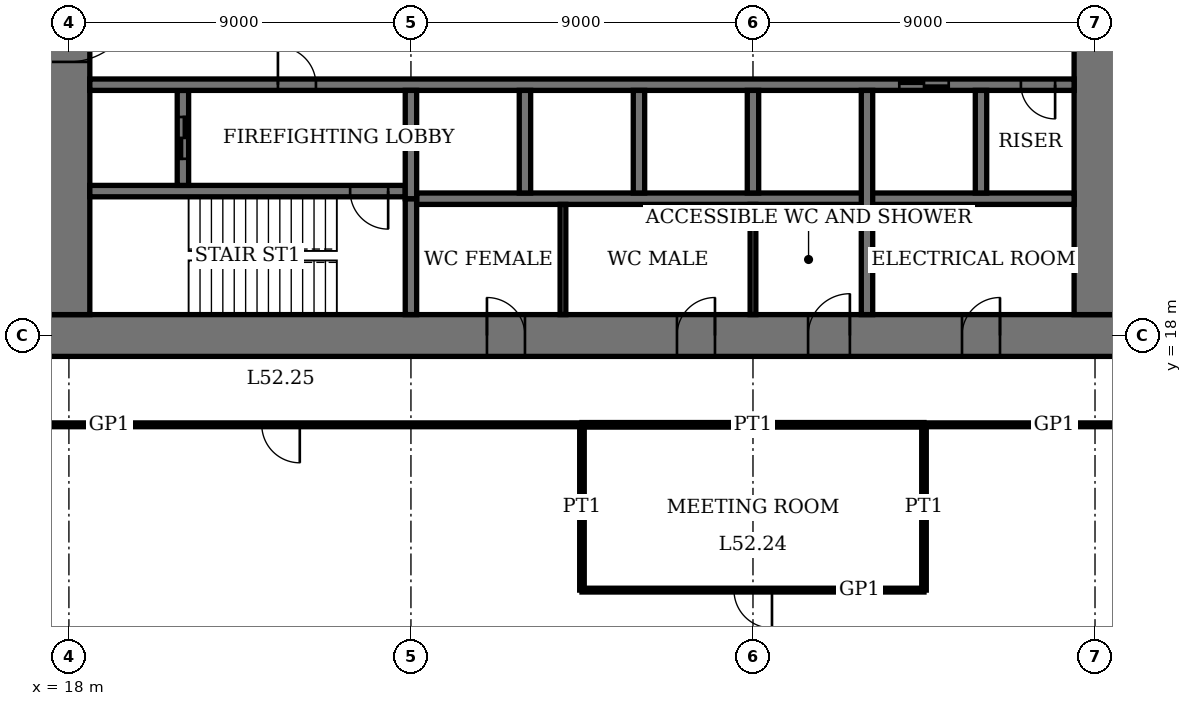
"""IFC4 building model, lengths in metres.
Left out: names, types, materials, properties, quantities, classifications, styles, units other than length and angle.
Written with IfcOpenShell. Run it as: python <this file> out.ifc"""

import sys

from ifc_helpers import new_model, si_unit, direction, frame, frame_2d, origin, place, context, subcontext, project, spatial, rectangle, extrude, element, fill, save


model = new_model("IFC4")
c1 = context("Model", 3, precision=1e-05, world=origin(), true_north=direction((0.0, 1.0)))
c2 = subcontext(c1, "Body", "Model", "MODEL_VIEW")
j1 = project(units=[si_unit("LENGTHUNIT", "METRE"), si_unit("PLANEANGLEUNIT", "RADIAN")], contexts=[c1])
p1 = place(None, origin())
s1 = spatial("IfcSite", under=j1, at=p1, CompositionType="ELEMENT")
p2 = place(p1, origin())
s2 = spatial("IfcBuilding", under=s1, at=p2, CompositionType="ELEMENT")
p3 = place(p2, frame((0.0, 0.0, 214.2)))
s3 = spatial("IfcBuildingStorey", under=s2, at=p3, CompositionType="ELEMENT", Elevation=214.2)
p4 = place(p3, frame((17.45, 18.0, 0.0), z_axis=(0.0, 0.0, 1.0), x_axis=(1.0, 0.0, 0.0)))
e1 = element("IfcWall", 1, at=p4, inside=s3, PredefinedType="SHEAR", context=c2, shape_type="SweptSolid", body=[
    extrude(rectangle(XDim=28.1, YDim=1.1, at=frame_2d((14.05, 0.0))), origin(), (0.0, 0.0, 1.0), 4.0),
])
p5 = place(p4, frame((11.55, 0.0, 0.0)))
e2 = element("IfcOpeningElement", 2, at=p5, cuts=e1, PredefinedType="OPENING", context=c2, shape_type="SweptSolid", body=[
    extrude(rectangle(XDim=1.0, YDim=2.4, at=frame_2d((0.5, 1.2))), frame((0.0, 0.56, 0.0), z_axis=(0.0, -1.0, 0.0), x_axis=(1.0, 0.0, 0.0)), (0.0, 0.0, 1.0), 1.12),
])
p6 = place(p4, frame((16.55, 0.0, 0.0)))
e3 = element("IfcOpeningElement", 3, at=p6, cuts=e1, PredefinedType="OPENING", context=c2, shape_type="SweptSolid", body=[
    extrude(rectangle(XDim=1.0, YDim=2.4, at=frame_2d((0.5, 1.2))), frame((0.0, 0.56, 0.0), z_axis=(0.0, -1.0, 0.0), x_axis=(1.0, 0.0, 0.0)), (0.0, 0.0, 1.0), 1.12),
])
p7 = place(p4, frame((20.0, 0.0, 0.0)))
e4 = element("IfcOpeningElement", 4, at=p7, cuts=e1, PredefinedType="OPENING", context=c2, shape_type="SweptSolid", body=[
    extrude(rectangle(XDim=1.1, YDim=2.4, at=frame_2d((0.55, 1.2))), frame((0.0, 0.56, 0.0), z_axis=(0.0, -1.0, 0.0), x_axis=(1.0, 0.0, 0.0)), (0.0, 0.0, 1.0), 1.12),
])
p8 = place(p4, frame((24.05, 0.0, 0.0)))
e5 = element("IfcOpeningElement", 5, at=p8, cuts=e1, PredefinedType="OPENING", context=c2, shape_type="SweptSolid", body=[
    extrude(rectangle(XDim=1.0, YDim=2.4, at=frame_2d((0.5, 1.2))), frame((0.0, 0.56, 0.0), z_axis=(0.0, -1.0, 0.0), x_axis=(1.0, 0.0, 0.0)), (0.0, 0.0, 1.0), 1.12),
])
p9 = place(p3, frame((18.0, 35.45, 0.0), z_axis=(0.0, 0.0, 1.0), x_axis=(0.0, -1.0, 0.0)))
e6 = element("IfcWall", 6, at=p9, inside=s3, PredefinedType="SHEAR", context=c2, shape_type="SweptSolid", body=[
    extrude(rectangle(XDim=16.9, YDim=1.1, at=frame_2d((8.45, 0.0))), origin(), (0.0, 0.0, 1.0), 4.0),
])
p10 = place(p9, frame((8.45, 0.0, 0.0)))
e7 = element("IfcOpeningElement", 7, at=p10, cuts=e6, PredefinedType="OPENING", context=c2, shape_type="SweptSolid", body=[
    extrude(rectangle(XDim=1.8, YDim=2.4, at=frame_2d((0.9, 1.2))), frame((0.0, 0.56, 0.0), z_axis=(0.0, -1.0, 0.0), x_axis=(1.0, 0.0, 0.0)), (0.0, 0.0, 1.0), 1.12),
])
p11 = place(p3, frame((45.0, 18.55, 0.0), z_axis=(0.0, 0.0, 1.0), x_axis=(0.0, 1.0, 0.0)))
e8 = element("IfcWall", 8, at=p11, inside=s3, PredefinedType="SHEAR", context=c2, shape_type="SweptSolid", body=[
    extrude(rectangle(XDim=16.9, YDim=1.1, at=frame_2d((8.45, 0.0))), origin(), (0.0, 0.0, 1.0), 4.0),
])
p12 = place(p11, frame((8.45, 0.0, 0.0)))
e9 = element("IfcOpeningElement", 9, at=p12, cuts=e8, PredefinedType="OPENING", context=c2, shape_type="SweptSolid", body=[
    extrude(rectangle(XDim=1.8, YDim=2.4, at=frame_2d((0.9, 1.2))), frame((0.0, 0.56, 0.0), z_axis=(0.0, -1.0, 0.0), x_axis=(1.0, 0.0, 0.0)), (0.0, 0.0, 1.0), 1.12),
])
p13 = place(p3, frame((18.55, 21.8, 0.0), z_axis=(0.0, 0.0, 1.0), x_axis=(1.0, 0.0, 0.0)))
e10 = element("IfcWall", 10, at=p13, inside=s3, PredefinedType="SHEAR", context=c2, shape_type="SweptSolid", body=[
    extrude(rectangle(XDim=8.3, YDim=0.3, at=frame_2d((4.15, 0.0))), origin(), (0.0, 0.0, 1.0), 4.0),
])
p14 = place(p13, frame((6.85, 0.0, 0.0)))
e11 = element("IfcOpeningElement", 11, at=p14, cuts=e10, PredefinedType="OPENING", context=c2, shape_type="SweptSolid", body=[
    extrude(rectangle(XDim=1.0, YDim=2.4, at=frame_2d((0.5, 1.2))), frame((0.0, 0.16, 0.0), z_axis=(0.0, -1.0, 0.0), x_axis=(1.0, 0.0, 0.0)), (0.0, 0.0, 1.0), 0.32),
])
p15 = place(p3, frame((27.0, 18.55, 0.0), z_axis=(0.0, 0.0, 1.0), x_axis=(0.0, 1.0, 0.0)))
e12 = element("IfcWall", 12, at=p15, inside=s3, PredefinedType="SHEAR", context=c2, shape_type="SweptSolid", body=[
    extrude(rectangle(XDim=3.05, YDim=0.3, at=frame_2d((1.525, 0.0))), origin(), (0.0, 0.0, 1.0), 4.0),
])
p16 = place(p3, frame((21.0, 21.95, 0.0), z_axis=(0.0, 0.0, 1.0), x_axis=(0.0, 1.0, 0.0)))
e13 = element("IfcWall", 13, at=p16, inside=s3, PredefinedType="SHEAR", context=c2, shape_type="SweptSolid", body=[
    extrude(rectangle(XDim=2.5, YDim=0.3, at=frame_2d((1.25, 0.0))), origin(), (0.0, 0.0, 1.0), 4.0),
])
p17 = place(p16, frame((0.7, 0.0, 0.0)))
e14 = element("IfcOpeningElement", 14, at=p17, cuts=e13, PredefinedType="OPENING", context=c2, shape_type="SweptSolid", body=[
    extrude(rectangle(XDim=1.1, YDim=2.4, at=frame_2d((0.55, 1.2))), frame((0.0, 0.16, 0.0), z_axis=(0.0, -1.0, 0.0), x_axis=(1.0, 0.0, 0.0)), (0.0, 0.0, 1.0), 0.32),
])
p18 = place(p3, frame((18.55, 24.6, 0.0), z_axis=(0.0, 0.0, 1.0), x_axis=(1.0, 0.0, 0.0)))
e15 = element("IfcWall", 15, at=p18, inside=s3, PredefinedType="SHEAR", context=c2, shape_type="SweptSolid", body=[
    extrude(rectangle(XDim=25.9, YDim=0.3, at=frame_2d((12.95, 0.0))), origin(), (0.0, 0.0, 1.0), 4.0),
])
p19 = place(p18, frame((4.95, 0.0, 0.0)))
e16 = element("IfcOpeningElement", 16, at=p19, cuts=e15, PredefinedType="OPENING", context=c2, shape_type="SweptSolid", body=[
    extrude(rectangle(XDim=1.0, YDim=2.4, at=frame_2d((0.5, 1.2))), frame((0.0, 0.16, 0.0), z_axis=(0.0, -1.0, 0.0), x_axis=(1.0, 0.0, 0.0)), (0.0, 0.0, 1.0), 0.32),
])
p20 = place(p18, frame((24.5, 0.0, 0.0)))
e17 = element("IfcOpeningElement", 17, at=p20, cuts=e15, PredefinedType="OPENING", context=c2, shape_type="SweptSolid", body=[
    extrude(rectangle(XDim=0.9, YDim=2.1, at=frame_2d((0.45, 1.05))), frame((0.0, 0.16, 0.0), z_axis=(0.0, -1.0, 0.0), x_axis=(1.0, 0.0, 0.0)), (0.0, 0.0, 1.0), 0.32),
])
p21 = place(p18, frame((21.3, 0.0, 0.0)))
e18 = element("IfcOpeningElement", 18, at=p21, cuts=e15, PredefinedType="OPENING", context=c2, shape_type="SweptSolid", body=[
    extrude(rectangle(XDim=1.3, YDim=2.4, at=frame_2d((0.65, 1.2))), frame((0.0, 0.16, 0.0), z_axis=(0.0, -1.0, 0.0), x_axis=(1.0, 0.0, 0.0)), (0.0, 0.0, 1.0), 0.32),
])
p22 = place(p3, frame((27.15, 21.6, 0.0), z_axis=(0.0, 0.0, 1.0), x_axis=(1.0, 0.0, 0.0)))
e19 = element("IfcWall", 19, at=p22, inside=s3, PredefinedType="SHEAR", context=c2, shape_type="SweptSolid", body=[
    extrude(rectangle(XDim=17.3, YDim=0.3, at=frame_2d((8.65, 0.0))), origin(), (0.0, 0.0, 1.0), 4.0),
])
for number, where, z_axis, x_axis in (
    (20, (30.0, 21.75, 0.0), (0.0, 0.0, 1.0), (0.0, 1.0, 0.0)),
    (21, (33.0, 21.75, 0.0), (0.0, 0.0, 1.0), (0.0, 1.0, 0.0)),
    (22, (36.0, 21.75, 0.0), (0.0, 0.0, 1.0), (0.0, 1.0, 0.0)),
):
    element("IfcWall", number, at=place(p3, frame(where, z_axis=z_axis, x_axis=x_axis)), inside=s3, PredefinedType="SHEAR", context=c2, shape_type="SweptSolid", body=[
        extrude(rectangle(XDim=2.7, YDim=0.3, at=frame_2d((1.35, 0.0))), origin(), (0.0, 0.0, 1.0), 4.0),
    ])
p23 = place(p3, frame((39.0, 18.55, 0.0), z_axis=(0.0, 0.0, 1.0), x_axis=(0.0, 1.0, 0.0)))
e23 = element("IfcWall", 23, at=p23, inside=s3, PredefinedType="SHEAR", context=c2, shape_type="SweptSolid", body=[
    extrude(rectangle(XDim=5.9, YDim=0.3, at=frame_2d((2.95, 0.0))), origin(), (0.0, 0.0, 1.0), 4.0),
])
p24 = place(p3, frame((42.0, 21.75, 0.0), z_axis=(0.0, 0.0, 1.0), x_axis=(0.0, 1.0, 0.0)))
e24 = element("IfcWall", 24, at=p24, inside=s3, PredefinedType="SHEAR", context=c2, shape_type="SweptSolid", body=[
    extrude(rectangle(XDim=2.7, YDim=0.3, at=frame_2d((1.35, 0.0))), origin(), (0.0, 0.0, 1.0), 4.0),
])
p25 = place(p3, frame((27.0, 21.6, 0.0), z_axis=(0.0, 0.0, 1.0), x_axis=(0.0, 1.0, 0.0)))
e25 = element("IfcWall", 25, at=p25, inside=s3, PredefinedType="SHEAR", context=c2, shape_type="SweptSolid", body=[
    extrude(rectangle(XDim=2.85, YDim=0.3, at=frame_2d((1.425, 0.0))), origin(), (0.0, 0.0, 1.0), 4.0),
])
p26 = place(p3, frame((31.5, 11.3, 0.0), z_axis=(0.0, 0.0, 1.0), x_axis=(1.0, 0.0, 0.0)))
e26 = element("IfcWall", 26, at=p26, inside=s3, PredefinedType="PARTITIONING", context=c2, shape_type="SweptSolid", body=[
    extrude(rectangle(XDim=9.0, YDim=0.1, at=frame_2d((4.5, 0.0))), origin(), (0.0, 0.0, 1.0), 3.75),
])
p27 = place(p26, frame((4.0, 0.0, 0.0)))
e27 = element("IfcOpeningElement", 27, at=p27, cuts=e26, PredefinedType="OPENING", context=c2, shape_type="SweptSolid", body=[
    extrude(rectangle(XDim=1.0, YDim=2.4, at=frame_2d((0.5, 1.2))), frame((0.0, 0.06, 0.0), z_axis=(0.0, -1.0, 0.0), x_axis=(1.0, 0.0, 0.0)), (0.0, 0.0, 1.0), 0.12),
])
p28 = place(p3, frame((31.5, 15.65, 0.0), z_axis=(0.0, 0.0, 1.0), x_axis=(1.0, 0.0, 0.0)))
e28 = element("IfcWall", 28, at=p28, inside=s3, PredefinedType="PARTITIONING", context=c2, shape_type="SweptSolid", body=[
    extrude(rectangle(XDim=9.0, YDim=0.12, at=frame_2d((4.5, 0.0))), origin(), (0.0, 0.0, 1.0), 3.75),
])
p29 = place(p3, frame((15.65, 15.65, 0.0), z_axis=(0.0, 0.0, 1.0), x_axis=(1.0, 0.0, 0.0)))
e29 = element("IfcWall", 29, at=p29, inside=s3, PredefinedType="PARTITIONING", context=c2, shape_type="SweptSolid", body=[
    extrude(rectangle(XDim=15.85, YDim=0.1, at=frame_2d((7.925, 0.0))), origin(), (0.0, 0.0, 1.0), 3.75),
])
p30 = place(p29, frame((7.425, 0.0, 0.0)))
e30 = element("IfcOpeningElement", 30, at=p30, cuts=e29, PredefinedType="OPENING", context=c2, shape_type="SweptSolid", body=[
    extrude(rectangle(XDim=1.0, YDim=2.4, at=frame_2d((0.5, 1.2))), frame((0.0, 0.06, 0.0), z_axis=(0.0, -1.0, 0.0), x_axis=(1.0, 0.0, 0.0)), (0.0, 0.0, 1.0), 0.12),
])
p31 = place(p3, frame((40.5, 15.65, 0.0), z_axis=(0.0, 0.0, 1.0), x_axis=(1.0, 0.0, 0.0)))
e31 = element("IfcWall", 31, at=p31, inside=s3, PredefinedType="PARTITIONING", context=c2, shape_type="SweptSolid", body=[
    extrude(rectangle(XDim=6.85, YDim=0.1, at=frame_2d((3.425, 0.0))), origin(), (0.0, 0.0, 1.0), 3.75),
])
for number, where, z_axis, x_axis in (
    (32, (31.5, 11.3, 0.0), (0.0, 0.0, 1.0), (0.0, 1.0, 0.0)),
    (33, (40.5, 11.3, 0.0), (0.0, 0.0, 1.0), (0.0, 1.0, 0.0)),
):
    element("IfcWall", number, at=place(p3, frame(where, z_axis=z_axis, x_axis=x_axis)), inside=s3, PredefinedType="PARTITIONING", context=c2, shape_type="SweptSolid", body=[
        extrude(rectangle(XDim=4.35, YDim=0.12, at=frame_2d((2.175, 0.0))), origin(), (0.0, 0.0, 1.0), 3.75),
    ])
for number, where, z_axis, x_axis in (
    (34, (31.0, 18.55, 0.0), (0.0, 0.0, 1.0), (0.0, 1.0, 0.0)),
    (35, (36.0, 18.55, 0.0), (0.0, 0.0, 1.0), (0.0, 1.0, 0.0)),
):
    element("IfcWall", number, at=place(p3, frame(where, z_axis=z_axis, x_axis=x_axis)), inside=s3, PredefinedType="PARTITIONING", context=c2, shape_type="SweptSolid", body=[
        extrude(rectangle(XDim=2.9, YDim=0.15, at=frame_2d((1.45, 0.0))), origin(), (0.0, 0.0, 1.0), 3.75),
    ])
p32 = place(p10, origin())
e36 = element("IfcDoor", 36, at=p32, inside=s3, OperationType="DOUBLE_DOOR_DOUBLE_SWING", PredefinedType="DOOR", context=c2, shape_type="SweptSolid", body=[
    extrude(rectangle(XDim=1.8, YDim=2.4, at=frame_2d((0.9, 1.2))), frame((0.0, 0.03, 0.0), z_axis=(0.0, -1.0, 0.0), x_axis=(1.0, 0.0, 0.0)), (0.0, 0.0, 1.0), 0.06),
    extrude(rectangle(XDim=0.04, YDim=2.4, at=frame_2d((0.02, 1.2))), frame((0.0, 0.55, 0.0), z_axis=(0.0, -1.0, 0.0), x_axis=(1.0, 0.0, 0.0)), (0.0, 0.0, 1.0), 1.1),
    extrude(rectangle(XDim=0.04, YDim=2.4, at=frame_2d((1.78, 1.2))), frame((0.0, 0.55, 0.0), z_axis=(0.0, -1.0, 0.0), x_axis=(1.0, 0.0, 0.0)), (0.0, 0.0, 1.0), 1.1),
    extrude(rectangle(XDim=1.8, YDim=0.04, at=frame_2d((0.9, 2.38))), frame((0.0, 0.55, 0.0), z_axis=(0.0, -1.0, 0.0), x_axis=(1.0, 0.0, 0.0)), (0.0, 0.0, 1.0), 1.1),
])
fill(e7, e36)
p33 = place(p5, origin())
e37 = element("IfcDoor", 37, at=p33, inside=s3, OperationType="SINGLE_SWING_RIGHT", PredefinedType="DOOR", context=c2, shape_type="SweptSolid", body=[
    extrude(rectangle(XDim=1.0, YDim=2.4, at=frame_2d((0.5, 1.2))), frame((0.0, 0.025, 0.0), z_axis=(0.0, -1.0, 0.0), x_axis=(1.0, 0.0, 0.0)), (0.0, 0.0, 1.0), 0.05),
    extrude(rectangle(XDim=0.04, YDim=2.4, at=frame_2d((0.02, 1.2))), frame((0.0, 0.4, 0.0), z_axis=(0.0, -1.0, 0.0), x_axis=(1.0, 0.0, 0.0)), (0.0, 0.0, 1.0), 0.8),
    extrude(rectangle(XDim=0.04, YDim=2.4, at=frame_2d((0.98, 1.2))), frame((0.0, 0.4, 0.0), z_axis=(0.0, -1.0, 0.0), x_axis=(1.0, 0.0, 0.0)), (0.0, 0.0, 1.0), 0.8),
    extrude(rectangle(XDim=1.0, YDim=0.04, at=frame_2d((0.5, 2.38))), frame((0.0, 0.4, 0.0), z_axis=(0.0, -1.0, 0.0), x_axis=(1.0, 0.0, 0.0)), (0.0, 0.0, 1.0), 0.8),
])
fill(e2, e37)
p34 = place(p6, origin())
e38 = element("IfcDoor", 38, at=p34, inside=s3, OperationType="SINGLE_SWING_LEFT", PredefinedType="DOOR", context=c2, shape_type="SweptSolid", body=[
    extrude(rectangle(XDim=1.0, YDim=2.4, at=frame_2d((0.5, 1.2))), frame((0.0, 0.025, 0.0), z_axis=(0.0, -1.0, 0.0), x_axis=(1.0, 0.0, 0.0)), (0.0, 0.0, 1.0), 0.05),
    extrude(rectangle(XDim=0.04, YDim=2.4, at=frame_2d((0.02, 1.2))), frame((0.0, 0.4, 0.0), z_axis=(0.0, -1.0, 0.0), x_axis=(1.0, 0.0, 0.0)), (0.0, 0.0, 1.0), 0.8),
    extrude(rectangle(XDim=0.04, YDim=2.4, at=frame_2d((0.98, 1.2))), frame((0.0, 0.4, 0.0), z_axis=(0.0, -1.0, 0.0), x_axis=(1.0, 0.0, 0.0)), (0.0, 0.0, 1.0), 0.8),
    extrude(rectangle(XDim=1.0, YDim=0.04, at=frame_2d((0.5, 2.38))), frame((0.0, 0.4, 0.0), z_axis=(0.0, -1.0, 0.0), x_axis=(1.0, 0.0, 0.0)), (0.0, 0.0, 1.0), 0.8),
])
fill(e3, e38)
p35 = place(p7, origin())
e39 = element("IfcDoor", 39, at=p35, inside=s3, OperationType="SINGLE_SWING_LEFT", PredefinedType="DOOR", context=c2, shape_type="SweptSolid", body=[
    extrude(rectangle(XDim=1.1, YDim=2.4, at=frame_2d((0.55, 1.2))), frame((0.0, 0.025, 0.0), z_axis=(0.0, -1.0, 0.0), x_axis=(1.0, 0.0, 0.0)), (0.0, 0.0, 1.0), 0.05),
    extrude(rectangle(XDim=0.04, YDim=2.4, at=frame_2d((0.02, 1.2))), frame((0.0, 0.44, 0.0), z_axis=(0.0, -1.0, 0.0), x_axis=(1.0, 0.0, 0.0)), (0.0, 0.0, 1.0), 0.88),
    extrude(rectangle(XDim=0.04, YDim=2.4, at=frame_2d((1.08, 1.2))), frame((0.0, 0.44, 0.0), z_axis=(0.0, -1.0, 0.0), x_axis=(1.0, 0.0, 0.0)), (0.0, 0.0, 1.0), 0.88),
    extrude(rectangle(XDim=1.1, YDim=0.04, at=frame_2d((0.55, 2.38))), frame((0.0, 0.44, 0.0), z_axis=(0.0, -1.0, 0.0), x_axis=(1.0, 0.0, 0.0)), (0.0, 0.0, 1.0), 0.88),
])
fill(e4, e39)
p36 = place(p8, origin())
e40 = element("IfcDoor", 40, at=p36, inside=s3, OperationType="SINGLE_SWING_LEFT", PredefinedType="DOOR", context=c2, shape_type="SweptSolid", body=[
    extrude(rectangle(XDim=1.0, YDim=2.4, at=frame_2d((0.5, 1.2))), frame((0.0, 0.025, 0.0), z_axis=(0.0, -1.0, 0.0), x_axis=(1.0, 0.0, 0.0)), (0.0, 0.0, 1.0), 0.05),
    extrude(rectangle(XDim=0.04, YDim=2.4, at=frame_2d((0.02, 1.2))), frame((0.0, 0.4, 0.0), z_axis=(0.0, -1.0, 0.0), x_axis=(1.0, 0.0, 0.0)), (0.0, 0.0, 1.0), 0.8),
    extrude(rectangle(XDim=0.04, YDim=2.4, at=frame_2d((0.98, 1.2))), frame((0.0, 0.4, 0.0), z_axis=(0.0, -1.0, 0.0), x_axis=(1.0, 0.0, 0.0)), (0.0, 0.0, 1.0), 0.8),
    extrude(rectangle(XDim=1.0, YDim=0.04, at=frame_2d((0.5, 2.38))), frame((0.0, 0.4, 0.0), z_axis=(0.0, -1.0, 0.0), x_axis=(1.0, 0.0, 0.0)), (0.0, 0.0, 1.0), 0.8),
])
fill(e5, e40)
p37 = place(p14, origin())
e41 = element("IfcDoor", 41, at=p37, inside=s3, OperationType="SINGLE_SWING_RIGHT", PredefinedType="DOOR", context=c2, shape_type="SweptSolid", body=[
    extrude(rectangle(XDim=1.0, YDim=2.4, at=frame_2d((0.5, 1.2))), frame((0.0, 0.03, 0.0), z_axis=(0.0, -1.0, 0.0), x_axis=(1.0, 0.0, 0.0)), (0.0, 0.0, 1.0), 0.06),
])
fill(e11, e41)
p38 = place(p19, origin())
e42 = element("IfcDoor", 42, at=p38, inside=s3, OperationType="SINGLE_SWING_RIGHT", PredefinedType="DOOR", context=c2, shape_type="SweptSolid", body=[
    extrude(rectangle(XDim=1.0, YDim=2.4, at=frame_2d((0.5, 1.2))), frame((0.0, 0.03, 0.0), z_axis=(0.0, -1.0, 0.0), x_axis=(1.0, 0.0, 0.0)), (0.0, 0.0, 1.0), 0.06),
])
fill(e16, e42)
p39 = place(p20, origin())
e43 = element("IfcDoor", 43, at=p39, inside=s3, OperationType="SINGLE_SWING_RIGHT", PredefinedType="DOOR", context=c2, shape_type="SweptSolid", body=[
    extrude(rectangle(XDim=0.9, YDim=2.1, at=frame_2d((0.45, 1.05))), frame((0.0, 0.03, 0.0), z_axis=(0.0, -1.0, 0.0), x_axis=(1.0, 0.0, 0.0)), (0.0, 0.0, 1.0), 0.06),
])
fill(e17, e43)
p40 = place(p27, origin())
e44 = element("IfcDoor", 44, at=p40, inside=s3, OperationType="SINGLE_SWING_RIGHT", PredefinedType="DOOR", context=c2, shape_type="SweptSolid", body=[
    extrude(rectangle(XDim=1.0, YDim=2.4, at=frame_2d((0.5, 1.2))), frame((0.0, 0.02, 0.0), z_axis=(0.0, -1.0, 0.0), x_axis=(1.0, 0.0, 0.0)), (0.0, 0.0, 1.0), 0.04),
])
fill(e27, e44)
p41 = place(p30, origin())
e45 = element("IfcDoor", 45, at=p41, inside=s3, OperationType="SINGLE_SWING_RIGHT", PredefinedType="DOOR", context=c2, shape_type="SweptSolid", body=[
    extrude(rectangle(XDim=1.0, YDim=2.4, at=frame_2d((0.5, 1.2))), frame((0.0, 0.02, 0.0), z_axis=(0.0, -1.0, 0.0), x_axis=(1.0, 0.0, 0.0)), (0.0, 0.0, 1.0), 0.04),
])
fill(e30, e45)
p42 = place(p21, origin())
e46 = element("IfcDoor", 46, at=p42, inside=s3, OperationType="DOUBLE_DOOR_SLIDING", PredefinedType="DOOR", context=c2, shape_type="SweptSolid", body=[
    extrude(rectangle(XDim=1.3, YDim=2.4, at=frame_2d((0.65, 1.2))), frame((0.0, 0.02, 0.0), z_axis=(0.0, -1.0, 0.0), x_axis=(1.0, 0.0, 0.0)), (0.0, 0.0, 1.0), 0.04),
])
fill(e18, e46)
p43 = place(p17, origin())
e47 = element("IfcDoor", 47, at=p43, inside=s3, OperationType="DOUBLE_DOOR_SLIDING", PredefinedType="DOOR", context=c2, shape_type="SweptSolid", body=[
    extrude(rectangle(XDim=1.1, YDim=2.4, at=frame_2d((0.55, 1.2))), frame((0.0, 0.03, 0.0), z_axis=(0.0, -1.0, 0.0), x_axis=(1.0, 0.0, 0.0)), (0.0, 0.0, 1.0), 0.06),
])
fill(e14, e47)
save(model, sys.argv[1])
